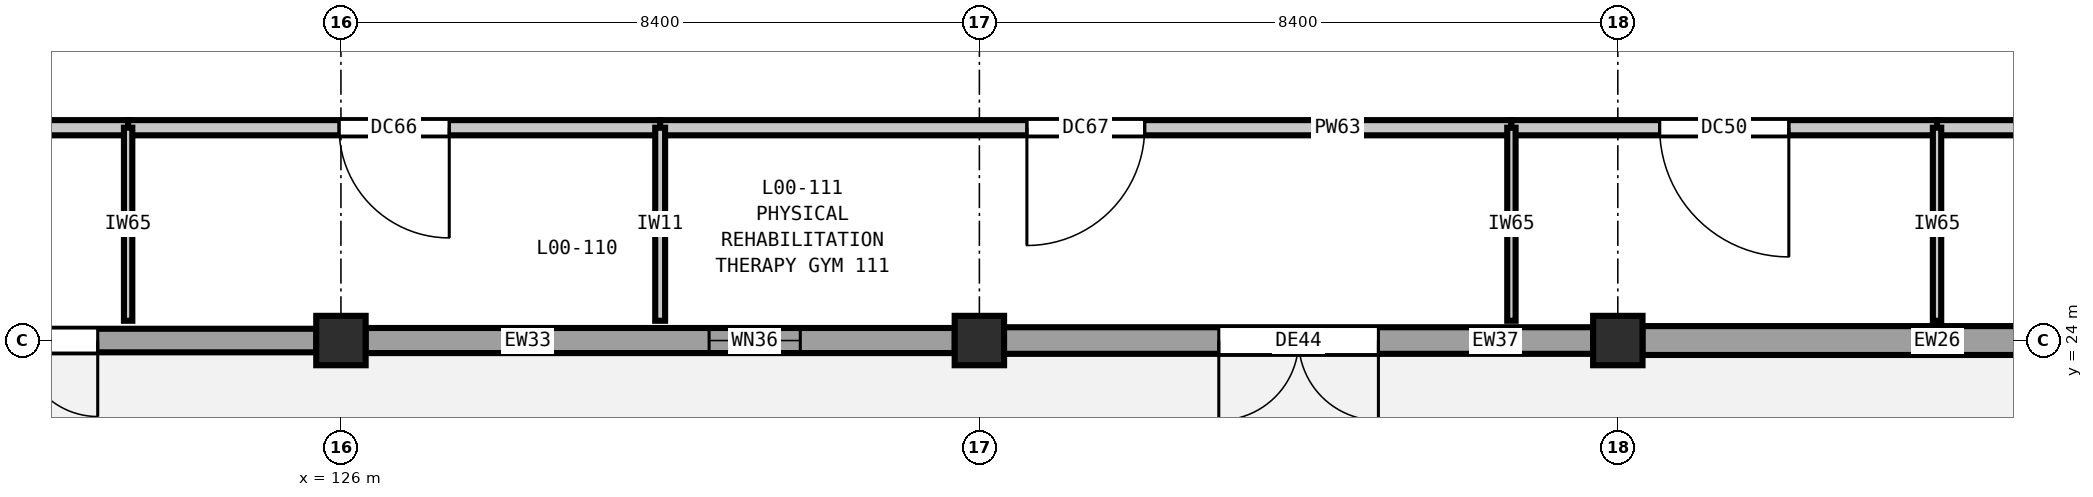
"""IFC4 building model, lengths in metres.
Left out: names, types, materials, properties, quantities, classifications, styles, units other than length and angle.
Written with IfcOpenShell. Run it as: python <this file> out.ifc"""

import sys

from ifc_helpers import new_model, si_unit, direction, frame, frame_2d, origin, origin_2d, place, context, subcontext, project, spatial, rectangle, extrude, element, fill, save


model = new_model("IFC4")
c1 = context("Model", 3, precision=1e-05, world=origin(), true_north=direction((0.0, 1.0)))
c2 = subcontext(c1, "Body", "Model", "MODEL_VIEW")
j1 = project(units=[si_unit("LENGTHUNIT", "METRE"), si_unit("PLANEANGLEUNIT", "RADIAN")], contexts=[c1])
p1 = place(None, origin())
s1 = spatial("IfcSite", under=j1, at=p1, CompositionType="ELEMENT")
p2 = place(p1, origin())
s2 = spatial("IfcBuilding", under=s1, at=p2, CompositionType="ELEMENT")
p3 = place(p2, origin())
s3 = spatial("IfcBuildingStorey", under=s2, at=p3, CompositionType="ELEMENT", Elevation=0.0)
for number, where, z_axis, x_axis in (
    (1, (126.0, 24.0, 0.0), (0.0, 0.0, 1.0), (1.0, 0.0, 0.0)),
    (2, (134.4, 24.0, 0.0), (0.0, 0.0, 1.0), (1.0, 0.0, 0.0)),
    (3, (142.8, 24.0, 0.0), (0.0, 0.0, 1.0), (1.0, 0.0, 0.0)),
):
    element("IfcColumn", number, at=place(p3, frame(where, z_axis=z_axis, x_axis=x_axis)), inside=s3, PredefinedType="COLUMN", context=c2, shape_type="SweptSolid", body=[
        extrude(rectangle(XDim=0.65, YDim=0.65, at=origin_2d()), origin(), (0.0, 0.0, 1.0), 5.4),
    ])
p4 = place(p3, frame((150.877, 24.0, 0.0), z_axis=(0.0, 0.0, 1.0), x_axis=(-1.0, 0.0, 0.0)))
e4 = element("IfcWall", 4, at=p4, inside=s3, PredefinedType="SOLIDWALL", context=c2, shape_type="SweptSolid", body=[
    extrude(rectangle(XDim=7.754, YDim=0.38, at=frame_2d((3.877, 0.0))), origin(), (0.0, 0.0, 1.0), 4.68),
])
p5 = place(p3, frame((142.477, 24.0, 0.0), z_axis=(0.0, 0.0, 1.0), x_axis=(-1.0, 0.0, 0.0)))
e5 = element("IfcWall", 5, at=p5, inside=s3, PredefinedType="SOLIDWALL", context=c2, shape_type="SweptSolid", body=[
    extrude(rectangle(XDim=7.754, YDim=0.35, at=frame_2d((3.877, 0.0))), origin(), (0.0, 0.0, 1.0), 4.68),
])
p6 = place(p5, frame((2.827, 0.0, 0.0)))
e6 = element("IfcOpeningElement", 6, at=p6, cuts=e5, PredefinedType="OPENING", context=c2, shape_type="SweptSolid", body=[
    extrude(rectangle(XDim=2.1, YDim=2.35, at=frame_2d((1.05, 1.175))), frame((0.0, 0.185, 0.0), z_axis=(0.0, -1.0, 0.0), x_axis=(1.0, 0.0, 0.0)), (0.0, 0.0, 1.0), 0.37),
])
p7 = place(p3, frame((134.077, 24.0, 0.0), z_axis=(0.0, 0.0, 1.0), x_axis=(-1.0, 0.0, 0.0)))
e7 = element("IfcWall", 7, at=p7, inside=s3, PredefinedType="SOLIDWALL", context=c2, shape_type="SweptSolid", body=[
    extrude(rectangle(XDim=7.754, YDim=0.33, at=frame_2d((3.877, 0.0))), origin(), (0.0, 0.0, 1.0), 4.68),
])
p8 = place(p7, frame((2.033, 0.0, 0.9)))
e8 = element("IfcOpeningElement", 8, at=p8, cuts=e7, PredefinedType="OPENING", context=c2, shape_type="SweptSolid", body=[
    extrude(rectangle(XDim=1.2, YDim=2.15, at=frame_2d((0.6, 1.075))), frame((0.0, 0.175, 0.0), z_axis=(0.0, -1.0, 0.0), x_axis=(1.0, 0.0, 0.0)), (0.0, 0.0, 1.0), 0.35),
])
p9 = place(p3, frame((125.677, 24.0, 0.0), z_axis=(0.0, 0.0, 1.0), x_axis=(-1.0, 0.0, 0.0)))
e9 = element("IfcWall", 9, at=p9, inside=s3, PredefinedType="SOLIDWALL", context=c2, shape_type="SweptSolid", body=[
    extrude(rectangle(XDim=7.754, YDim=0.31, at=frame_2d((3.877, 0.0))), origin(), (0.0, 0.0, 1.0), 4.68),
])
p10 = place(p9, frame((2.877, 0.0, 0.0)))
e10 = element("IfcOpeningElement", 10, at=p10, cuts=e9, PredefinedType="OPENING", context=c2, shape_type="SweptSolid", body=[
    extrude(rectangle(XDim=2.0, YDim=2.3, at=frame_2d((1.0, 1.15))), frame((0.0, 0.165, 0.0), z_axis=(0.0, -1.0, 0.0), x_axis=(1.0, 0.0, 0.0)), (0.0, 0.0, 1.0), 0.33),
])
p11 = place(p3, frame((117.6, 26.8, 0.0), z_axis=(0.0, 0.0, 1.0), x_axis=(1.0, 0.0, 0.0)))
e11 = element("IfcWall", 11, at=p11, inside=s3, PredefinedType="PARTITIONING", context=c2, shape_type="SweptSolid", body=[
    extrude(rectangle(XDim=5.6, YDim=0.2, at=frame_2d((2.8, 0.0))), origin(), (0.0, 0.0, 1.0), 5.04),
])
p12 = place(p11, frame((2.125, 0.0, 0.0)))
e12 = element("IfcOpeningElement", 12, at=p12, cuts=e11, PredefinedType="OPENING", context=c2, shape_type="SweptSolid", body=[
    extrude(rectangle(XDim=1.35, YDim=2.2, at=frame_2d((0.675, 1.1))), frame((0.0, 0.11, 0.0), z_axis=(0.0, -1.0, 0.0), x_axis=(1.0, 0.0, 0.0)), (0.0, 0.0, 1.0), 0.22),
])
p13 = place(p3, frame((123.2, 26.8, 0.0), z_axis=(0.0, 0.0, 1.0), x_axis=(1.0, 0.0, 0.0)))
e13 = element("IfcWall", 13, at=p13, inside=s3, PredefinedType="PARTITIONING", context=c2, shape_type="SweptSolid", body=[
    extrude(rectangle(XDim=7.0, YDim=0.2, at=frame_2d((3.5, 0.0))), origin(), (0.0, 0.0, 1.0), 5.04),
])
p14 = place(p13, frame((2.775, 0.0, 0.0)))
e14 = element("IfcOpeningElement", 14, at=p14, cuts=e13, PredefinedType="OPENING", context=c2, shape_type="SweptSolid", body=[
    extrude(rectangle(XDim=1.45, YDim=2.25, at=frame_2d((0.725, 1.125))), frame((0.0, 0.11, 0.0), z_axis=(0.0, -1.0, 0.0), x_axis=(1.0, 0.0, 0.0)), (0.0, 0.0, 1.0), 0.22),
])
p15 = place(p3, frame((130.2, 26.8, 0.0), z_axis=(0.0, 0.0, 1.0), x_axis=(1.0, 0.0, 0.0)))
e15 = element("IfcWall", 15, at=p15, inside=s3, PredefinedType="PARTITIONING", context=c2, shape_type="SweptSolid", body=[
    extrude(rectangle(XDim=11.2, YDim=0.2, at=frame_2d((5.6, 0.0))), origin(), (0.0, 0.0, 1.0), 5.04),
])
p16 = place(p15, frame((4.825, 0.0, 0.0)))
e16 = element("IfcOpeningElement", 16, at=p16, cuts=e15, PredefinedType="OPENING", context=c2, shape_type="SweptSolid", body=[
    extrude(rectangle(XDim=1.55, YDim=2.25, at=frame_2d((0.775, 1.125))), frame((0.0, 0.11, 0.0), z_axis=(0.0, -1.0, 0.0), x_axis=(1.0, 0.0, 0.0)), (0.0, 0.0, 1.0), 0.22),
])
p17 = place(p3, frame((141.4, 26.8, 0.0), z_axis=(0.0, 0.0, 1.0), x_axis=(1.0, 0.0, 0.0)))
e17 = element("IfcWall", 17, at=p17, inside=s3, PredefinedType="PARTITIONING", context=c2, shape_type="SweptSolid", body=[
    extrude(rectangle(XDim=5.6, YDim=0.2, at=frame_2d((2.8, 0.0))), origin(), (0.0, 0.0, 1.0), 5.04),
])
p18 = place(p17, frame((1.95, 0.0, 0.0)))
e18 = element("IfcOpeningElement", 18, at=p18, cuts=e17, PredefinedType="OPENING", context=c2, shape_type="SweptSolid", body=[
    extrude(rectangle(XDim=1.7, YDim=2.3, at=frame_2d((0.85, 1.15))), frame((0.0, 0.11, 0.0), z_axis=(0.0, -1.0, 0.0), x_axis=(1.0, 0.0, 0.0)), (0.0, 0.0, 1.0), 0.22),
])
p19 = place(p3, frame((147.0, 26.8, 0.0), z_axis=(0.0, 0.0, 1.0), x_axis=(1.0, 0.0, 0.0)))
e19 = element("IfcWall", 19, at=p19, inside=s3, PredefinedType="PARTITIONING", context=c2, shape_type="SweptSolid", body=[
    extrude(rectangle(XDim=4.2, YDim=0.2, at=frame_2d((2.1, 0.0))), origin(), (0.0, 0.0, 1.0), 5.04),
])
p20 = place(p19, frame((1.175, 0.0, 0.0)))
e20 = element("IfcOpeningElement", 20, at=p20, cuts=e19, PredefinedType="OPENING", context=c2, shape_type="SweptSolid", body=[
    extrude(rectangle(XDim=1.85, YDim=2.3, at=frame_2d((0.925, 1.15))), frame((0.0, 0.11, 0.0), z_axis=(0.0, -1.0, 0.0), x_axis=(1.0, 0.0, 0.0)), (0.0, 0.0, 1.0), 0.22),
])
p21 = place(p3, frame((123.2, 24.26, 0.0), z_axis=(0.0, 0.0, 1.0), x_axis=(0.0, 1.0, 0.0)))
e21 = element("IfcWall", 21, at=p21, inside=s3, PredefinedType="PARTITIONING", context=c2, shape_type="SweptSolid", body=[
    extrude(rectangle(XDim=2.54, YDim=0.11, at=frame_2d((1.27, 0.0))), origin(), (0.0, 0.0, 1.0), 5.04),
])
p22 = place(p3, frame((130.2, 24.26, 0.0), z_axis=(0.0, 0.0, 1.0), x_axis=(0.0, 1.0, 0.0)))
e22 = element("IfcWall", 22, at=p22, inside=s3, PredefinedType="PARTITIONING", context=c2, shape_type="SweptSolid", body=[
    extrude(rectangle(XDim=2.54, YDim=0.13, at=frame_2d((1.27, 0.0))), origin(), (0.0, 0.0, 1.0), 5.04),
])
for number, where, z_axis, x_axis in (
    (23, (141.4, 24.26, 0.0), (0.0, 0.0, 1.0), (0.0, 1.0, 0.0)),
    (24, (147.0, 24.26, 0.0), (0.0, 0.0, 1.0), (0.0, 1.0, 0.0)),
):
    element("IfcWall", number, at=place(p3, frame(where, z_axis=z_axis, x_axis=x_axis)), inside=s3, PredefinedType="PARTITIONING", context=c2, shape_type="SweptSolid", body=[
        extrude(rectangle(XDim=2.54, YDim=0.11, at=frame_2d((1.27, 0.0))), origin(), (0.0, 0.0, 1.0), 5.04),
    ])
p23 = place(p6, origin())
e25 = element("IfcDoor", 25, at=p23, inside=s3, OperationType="DOUBLE_DOOR_SINGLE_SWING", PredefinedType="DOOR", context=c2, shape_type="SweptSolid", body=[
    extrude(rectangle(XDim=2.1, YDim=2.35, at=frame_2d((1.05, 1.175))), frame((0.0, 0.025, 0.0), z_axis=(0.0, -1.0, 0.0), x_axis=(1.0, 0.0, 0.0)), (0.0, 0.0, 1.0), 0.05),
])
fill(e6, e25)
p24 = place(p8, origin())
e26 = element("IfcWindow", 26, at=p24, inside=s3, PartitioningType="SINGLE_PANEL", PredefinedType="WINDOW", context=c2, shape_type="SweptSolid", body=[
    extrude(rectangle(XDim=1.2, YDim=2.15, at=frame_2d((0.6, 1.075))), frame((0.0, 0.03, 0.0), z_axis=(0.0, -1.0, 0.0), x_axis=(1.0, 0.0, 0.0)), (0.0, 0.0, 1.0), 0.06),
])
fill(e8, e26)
p25 = place(p10, origin())
e27 = element("IfcDoor", 27, at=p25, inside=s3, OperationType="DOUBLE_DOOR_SINGLE_SWING", PredefinedType="DOOR", context=c2, shape_type="SweptSolid", body=[
    extrude(rectangle(XDim=2.0, YDim=2.3, at=frame_2d((1.0, 1.15))), frame((0.0, 0.025, 0.0), z_axis=(0.0, -1.0, 0.0), x_axis=(1.0, 0.0, 0.0)), (0.0, 0.0, 1.0), 0.05),
])
fill(e10, e27)
p26 = place(p14, frame((1.45, 0.0, 0.0), z_axis=(0.0, 0.0, 1.0), x_axis=(-1.0, 0.0, 0.0)))
e28 = element("IfcDoor", 28, at=p26, inside=s3, OperationType="SINGLE_SWING_LEFT", PredefinedType="DOOR", context=c2, shape_type="SweptSolid", body=[
    extrude(rectangle(XDim=1.45, YDim=2.25, at=frame_2d((0.725, 1.125))), frame((0.0, 0.025, 0.0), z_axis=(0.0, -1.0, 0.0), x_axis=(1.0, 0.0, 0.0)), (0.0, 0.0, 1.0), 0.05),
])
fill(e14, e28)
p27 = place(p16, frame((1.55, 0.0, 0.0), z_axis=(0.0, 0.0, 1.0), x_axis=(-1.0, 0.0, 0.0)))
e29 = element("IfcDoor", 29, at=p27, inside=s3, OperationType="SINGLE_SWING_RIGHT", PredefinedType="DOOR", context=c2, shape_type="SweptSolid", body=[
    extrude(rectangle(XDim=1.55, YDim=2.25, at=frame_2d((0.775, 1.125))), frame((0.0, 0.025, 0.0), z_axis=(0.0, -1.0, 0.0), x_axis=(1.0, 0.0, 0.0)), (0.0, 0.0, 1.0), 0.05),
])
fill(e16, e29)
p28 = place(p18, frame((1.7, 0.0, 0.0), z_axis=(0.0, 0.0, 1.0), x_axis=(-1.0, 0.0, 0.0)))
e30 = element("IfcDoor", 30, at=p28, inside=s3, OperationType="SINGLE_SWING_LEFT", PredefinedType="DOOR", context=c2, shape_type="SweptSolid", body=[
    extrude(rectangle(XDim=1.7, YDim=2.3, at=frame_2d((0.85, 1.15))), frame((0.0, 0.025, 0.0), z_axis=(0.0, -1.0, 0.0), x_axis=(1.0, 0.0, 0.0)), (0.0, 0.0, 1.0), 0.05),
])
fill(e18, e30)
save(model, sys.argv[1])
